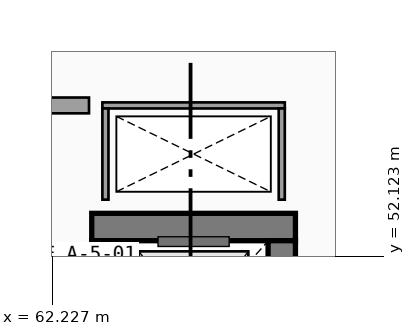
"""IFC4 building model, lengths in metres.
Left out: names, types, materials, properties, quantities, classifications, styles, units other than length and angle.
Written with IfcOpenShell. Run it as: python <this file> out.ifc"""

import sys

from ifc_helpers import new_model, si_unit, direction, frame, frame_2d, origin, place, context, subcontext, project, spatial, rectangle, extrude, element, save


model = new_model("IFC4")
c1 = context("Model", 3, precision=1e-05, world=origin(), true_north=direction((0.0, 1.0)))
c2 = subcontext(c1, "Body", "Model", "MODEL_VIEW")
j1 = project(units=[si_unit("LENGTHUNIT", "METRE"), si_unit("PLANEANGLEUNIT", "RADIAN")], contexts=[c1])
p1 = place(None, origin())
s1 = spatial("IfcSite", under=j1, at=p1, CompositionType="ELEMENT")
p2 = place(p1, origin())
s2 = spatial("IfcBuilding", under=s1, at=p2, CompositionType="ELEMENT")
p3 = place(p2, frame((0.0, 0.0, 9.6)))
s3 = spatial("IfcBuildingStorey", under=s2, at=p3, CompositionType="ELEMENT", Elevation=9.6)
p4 = place(p3, frame((66.225, 52.6, 0.0), z_axis=(0.0, 0.0, 1.0), x_axis=(-1.0, 0.0, 0.0)))
e1 = element("IfcWall", 1, at=p4, inside=s3, PredefinedType="SHEAR", context=c2, shape_type="SweptSolid", body=[
    extrude(rectangle(XDim=3.35, YDim=0.45, at=frame_2d((1.675, 0.0))), origin(), (0.0, 0.0, 1.0), 4.22),
])
p5 = place(p3, frame((63.1, 52.375, 0.0), z_axis=(0.0, 0.0, 1.0), x_axis=(0.0, -1.0, 0.0)))
e2 = element("IfcWall", 2, at=p5, inside=s3, PredefinedType="SHEAR", context=c2, shape_type="SweptSolid", body=[
    extrude(rectangle(XDim=2.75, YDim=0.45, at=frame_2d((1.375, 0.0))), origin(), (0.0, 0.0, 1.0), 4.22),
])
p6 = place(p5, frame((0.725, 0.0, 0.0), z_axis=(0.0, 0.0, 1.0), x_axis=(1.0, 0.0, 0.0)))
e3 = element("IfcOpeningElement", 3, at=p6, cuts=e2, PredefinedType="OPENING", context=c2, shape_type="SweptSolid", body=[
    extrude(rectangle(XDim=1.3, YDim=2.25, at=frame_2d((0.65, 1.125))), frame((0.0, 0.235, 0.0), z_axis=(0.0, -1.0, 0.0), x_axis=(1.0, 0.0, 0.0)), (0.0, 0.0, 1.0), 0.47),
])
p7 = place(p3, frame((66.0, 49.625, 0.0), z_axis=(0.0, 0.0, 1.0), x_axis=(0.0, 1.0, 0.0)))
e4 = element("IfcWall", 4, at=p7, inside=s3, PredefinedType="SHEAR", context=c2, shape_type="SweptSolid", body=[
    extrude(rectangle(XDim=2.75, YDim=0.45, at=frame_2d((1.375, 0.0))), origin(), (0.0, 0.0, 1.0), 4.22),
])
p8 = place(p3, frame((66.05, 54.6, 0.0), z_axis=(0.0, 0.0, 1.0), x_axis=(-1.0, 0.0, 0.0)))
e5 = element("IfcWall", 5, at=p8, inside=s3, PredefinedType="PARTITIONING", context=c2, shape_type="SweptSolid", body=[
    extrude(rectangle(XDim=3.0, YDim=0.1, at=frame_2d((1.5, 0.0))), origin(), (0.0, 0.0, 1.0), 4.22),
])
for number, where, z_axis, x_axis in (
    (6, (63.1, 54.55, 0.0), (0.0, 0.0, 1.0), (0.0, -1.0, 0.0)),
    (7, (66.0, 53.05, 0.0), (0.0, 0.0, 1.0), (0.0, 1.0, 0.0)),
):
    element("IfcWall", number, at=place(p3, frame(where, z_axis=z_axis, x_axis=x_axis)), inside=s3, PredefinedType="PARTITIONING", context=c2, shape_type="SweptSolid", body=[
        extrude(rectangle(XDim=1.5, YDim=0.1, at=frame_2d((0.75, 0.0))), origin(), (0.0, 0.0, 1.0), 4.22),
    ])
p9 = place(p3, frame((62.83, 54.6, 0.0), z_axis=(0.0, 0.0, 1.0), x_axis=(-1.0, 0.0, 0.0)))
e8 = element("IfcWall", 8, at=p9, inside=s3, PredefinedType="SOLIDWALL", context=c2, shape_type="SweptSolid", body=[
    extrude(rectangle(XDim=3.76, YDim=0.26, at=frame_2d((1.88, 0.0))), origin(), (0.0, 0.0, 1.0), 4.22),
])
save(model, sys.argv[1])
